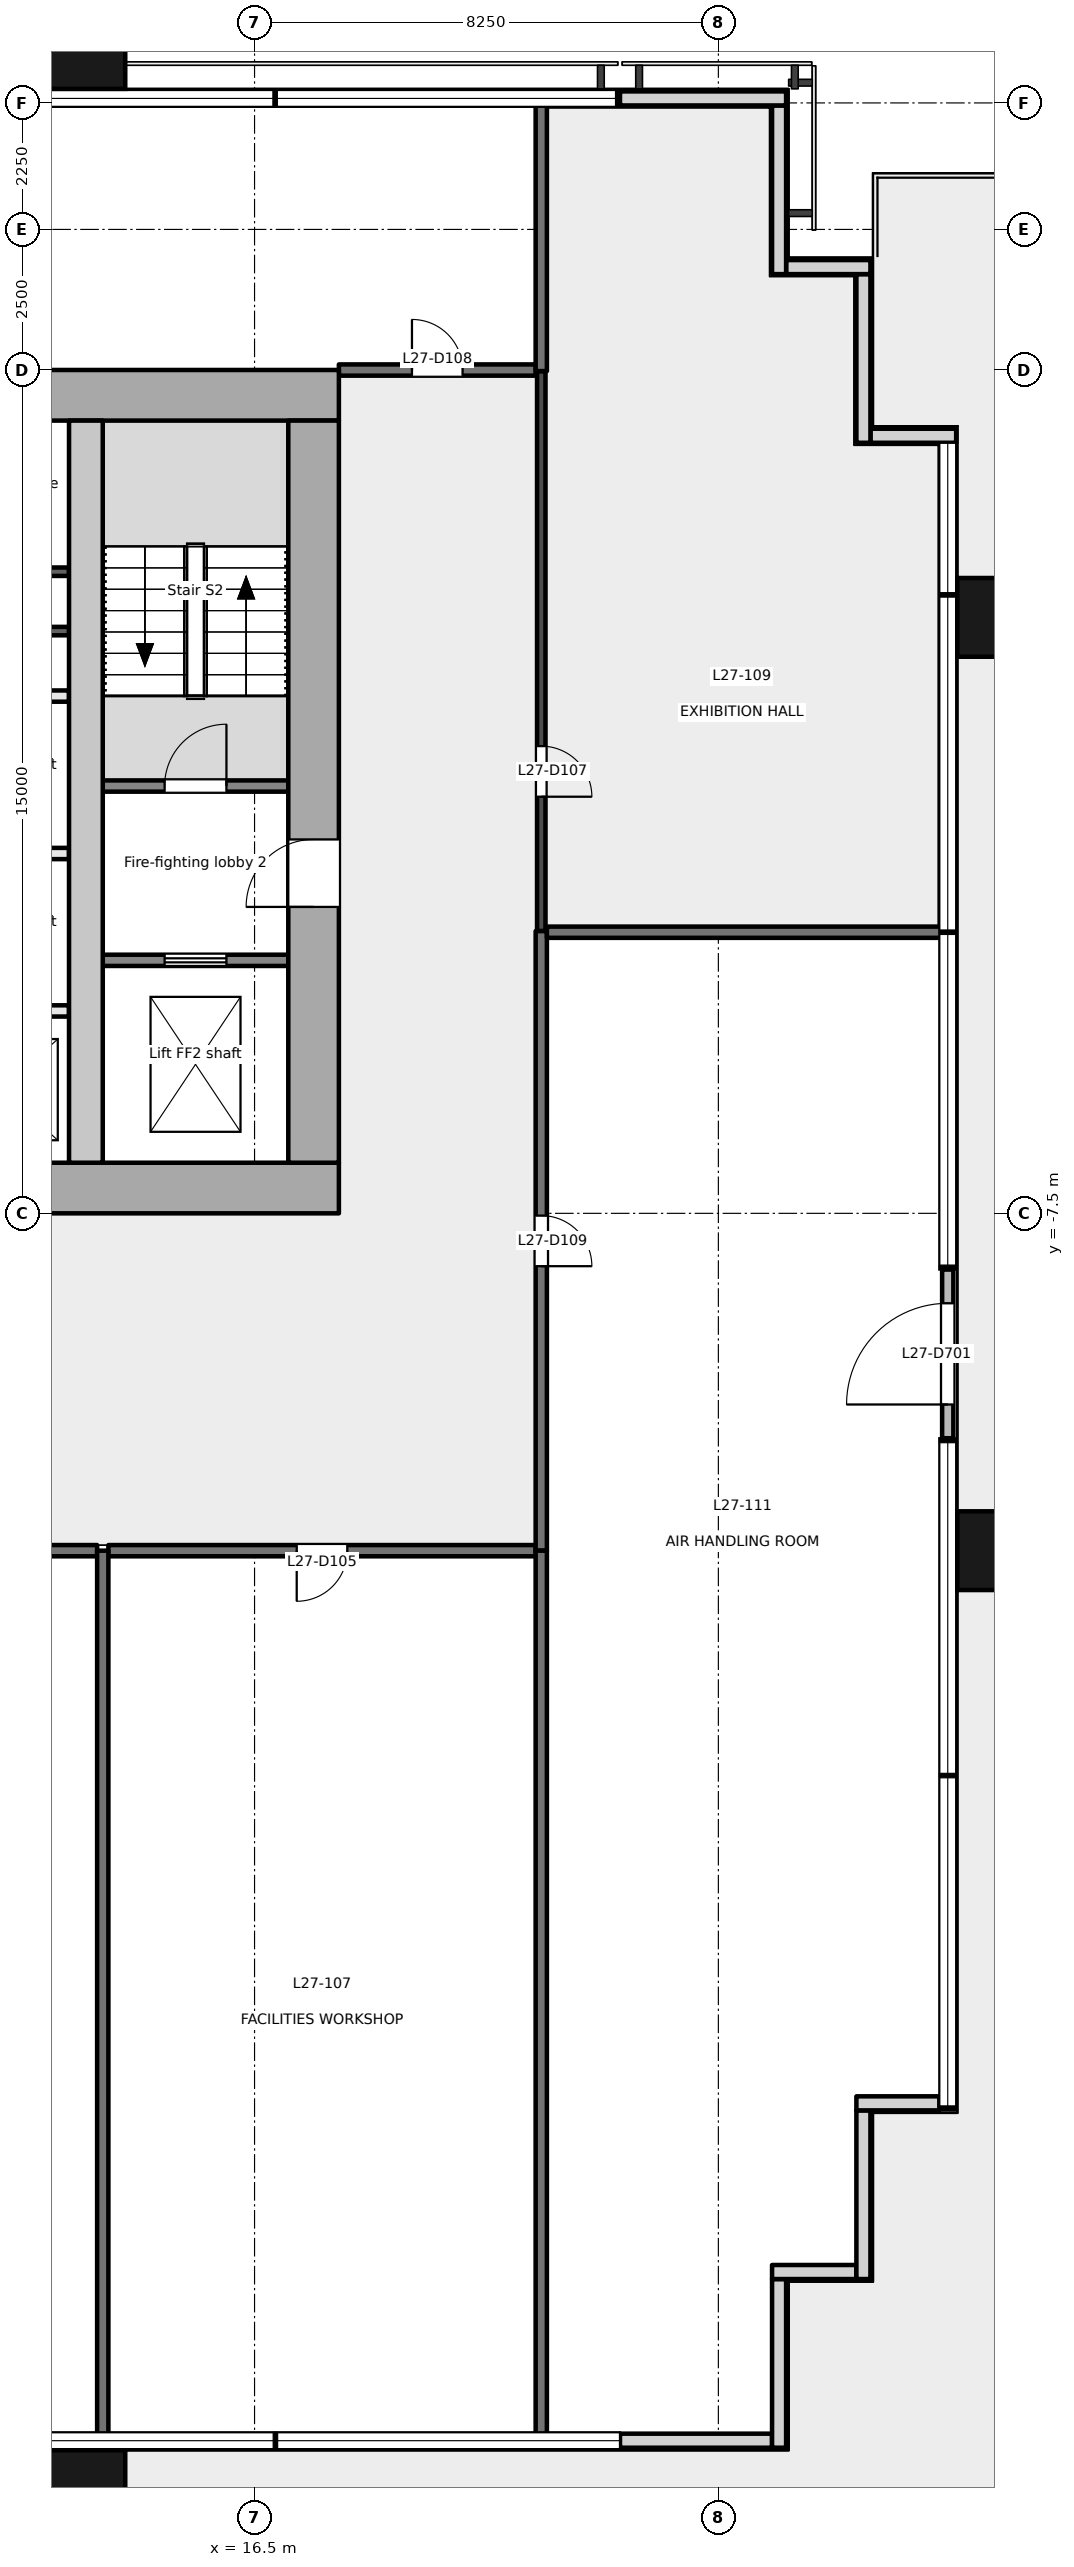
"""IFC4 building model, lengths in metres.
Left out: names, types, materials, properties, quantities, classifications, styles, units other than length and angle.
Written with IfcOpenShell. Run it as: python <this file> out.ifc"""

import sys

from ifc_helpers import new_model, si_unit, direction, frame, frame_2d, origin, origin_2d, place, context, subcontext, project, spatial, rectangle, extrude, element, fill, save


model = new_model("IFC4")
c1 = context("Model", 3, precision=1e-05, world=origin(), true_north=direction((0.0, 1.0)))
c2 = subcontext(c1, "Body", "Model", "MODEL_VIEW")
j1 = project(units=[si_unit("LENGTHUNIT", "METRE"), si_unit("PLANEANGLEUNIT", "RADIAN")], contexts=[c1])
p1 = place(None, origin())
s1 = spatial("IfcSite", under=j1, at=p1, CompositionType="ELEMENT")
p2 = place(p1, origin())
s2 = spatial("IfcBuilding", under=s1, at=p2, CompositionType="ELEMENT")
p3 = place(p2, frame((0.0, 0.0, 120.7)))
s3 = spatial("IfcBuildingStorey", under=s2, at=p3, CompositionType="ELEMENT", Elevation=120.7)
for number, where, z_axis, x_axis in (
    (1, (13.5, -30.4, -0.2), (0.0, 0.0, 1.0), (1.0, 0.0, 0.0)),
    (2, (29.9, -13.5, -0.2), (0.0, 0.0, 1.0), (0.0, 1.0, 0.0)),
    (3, (29.9, 3.1, -0.2), (0.0, 0.0, 1.0), (0.0, 1.0, 0.0)),
    (4, (13.5, 13.4, -0.2), (0.0, 0.0, 1.0), (1.0, 0.0, 0.0)),
):
    element("IfcColumn", number, at=place(p3, frame(where, z_axis=z_axis, x_axis=x_axis)), inside=s3, PredefinedType="COLUMN", context=c2, shape_type="SweptSolid", body=[
        extrude(rectangle(XDim=1.4, YDim=1.8, at=origin_2d()), origin(), (0.0, 0.0, 1.0), 5.4),
    ])
p4 = place(p3, frame((23.0, -29.33, 0.0), z_axis=(0.0, 0.0, 1.0), x_axis=(1.0, 0.0, 0.0)))
e5 = element("IfcWall", 5, at=p4, inside=s3, PredefinedType="SOLIDWALL", context=c2, shape_type="SweptSolid", body=[
    extrude(rectangle(XDim=2.705, YDim=0.25, at=frame_2d((1.353, 0.0))), origin(), (0.0, 0.0, 1.0), 5.2),
])
p5 = place(p3, frame((25.83, -29.455, 0.0), z_axis=(0.0, 0.0, 1.0), x_axis=(0.0, 1.0, 0.0)))
e6 = element("IfcWall", 6, at=p5, inside=s3, PredefinedType="SOLIDWALL", context=c2, shape_type="SweptSolid", body=[
    extrude(rectangle(XDim=3.0, YDim=0.25, at=frame_2d((1.5, 0.0))), origin(), (0.0, 0.0, 1.0), 5.2),
])
p6 = place(p3, frame((25.705, -26.33, 0.0), z_axis=(0.0, 0.0, 1.0), x_axis=(1.0, 0.0, 0.0)))
e7 = element("IfcWall", 7, at=p6, inside=s3, PredefinedType="SOLIDWALL", context=c2, shape_type="SweptSolid", body=[
    extrude(rectangle(XDim=1.5, YDim=0.25, at=frame_2d((0.75, 0.0))), origin(), (0.0, 0.0, 1.0), 5.2),
])
p7 = place(p3, frame((27.33, -26.455, 0.0), z_axis=(0.0, 0.0, 1.0), x_axis=(0.0, 1.0, 0.0)))
e8 = element("IfcWall", 8, at=p7, inside=s3, PredefinedType="SOLIDWALL", context=c2, shape_type="SweptSolid", body=[
    extrude(rectangle(XDim=3.0, YDim=0.25, at=frame_2d((1.5, 0.0))), origin(), (0.0, 0.0, 1.0), 5.2),
])
p8 = place(p3, frame((27.205, -23.33, 0.0), z_axis=(0.0, 0.0, 1.0), x_axis=(1.0, 0.0, 0.0)))
e9 = element("IfcWall", 9, at=p8, inside=s3, PredefinedType="SOLIDWALL", context=c2, shape_type="SweptSolid", body=[
    extrude(rectangle(XDim=1.475, YDim=0.25, at=frame_2d((0.737, 0.0))), origin(), (0.0, 0.0, 1.0), 5.2),
])
p9 = place(p3, frame((28.83, -11.5, 0.0), z_axis=(0.0, 0.0, 1.0), x_axis=(0.0, 1.0, 0.0)))
e10 = element("IfcWall", 10, at=p9, inside=s3, PredefinedType="SOLIDWALL", context=c2, shape_type="SweptSolid", body=[
    extrude(rectangle(XDim=3.0, YDim=0.2, at=frame_2d((1.5, 0.0))), origin(), (0.0, 0.0, 1.0), 4.1),
])
p10 = place(p9, frame((0.6, 0.0, 0.0)))
e11 = element("IfcOpeningElement", 11, at=p10, cuts=e10, PredefinedType="OPENING", context=c2, shape_type="SweptSolid", body=[
    extrude(rectangle(XDim=1.8, YDim=2.4, at=frame_2d((0.9, 1.2))), frame((0.0, 0.111, 0.0), z_axis=(0.0, -1.0, 0.0), x_axis=(1.0, 0.0, 0.0)), (0.0, 0.0, 1.0), 0.221),
])
p11 = place(p3, frame((28.98, 6.33, 0.0), z_axis=(0.0, 0.0, 1.0), x_axis=(-1.0, 0.0, 0.0)))
e12 = element("IfcWall", 12, at=p11, inside=s3, PredefinedType="SOLIDWALL", context=c2, shape_type="SweptSolid", body=[
    extrude(rectangle(XDim=1.525, YDim=0.25, at=frame_2d((0.762, 0.0))), origin(), (0.0, 0.0, 1.0), 5.2),
])
p12 = place(p3, frame((27.33, 6.205, 0.0), z_axis=(0.0, 0.0, 1.0), x_axis=(0.0, 1.0, 0.0)))
e13 = element("IfcWall", 13, at=p12, inside=s3, PredefinedType="SOLIDWALL", context=c2, shape_type="SweptSolid", body=[
    extrude(rectangle(XDim=3.0, YDim=0.25, at=frame_2d((1.5, 0.0))), origin(), (0.0, 0.0, 1.0), 5.2),
])
p13 = place(p3, frame((27.455, 9.33, 0.0), z_axis=(0.0, 0.0, 1.0), x_axis=(-1.0, 0.0, 0.0)))
e14 = element("IfcWall", 14, at=p13, inside=s3, PredefinedType="SOLIDWALL", context=c2, shape_type="SweptSolid", body=[
    extrude(rectangle(XDim=1.5, YDim=0.25, at=frame_2d((0.75, 0.0))), origin(), (0.0, 0.0, 1.0), 5.2),
])
p14 = place(p3, frame((25.83, 9.205, 0.0), z_axis=(0.0, 0.0, 1.0), x_axis=(0.0, 1.0, 0.0)))
e15 = element("IfcWall", 15, at=p14, inside=s3, PredefinedType="SOLIDWALL", context=c2, shape_type="SweptSolid", body=[
    extrude(rectangle(XDim=3.0, YDim=0.25, at=frame_2d((1.5, 0.0))), origin(), (0.0, 0.0, 1.0), 5.2),
])
p15 = place(p3, frame((25.955, 12.33, 0.0), z_axis=(0.0, 0.0, 1.0), x_axis=(-1.0, 0.0, 0.0)))
e16 = element("IfcWall", 16, at=p15, inside=s3, PredefinedType="SOLIDWALL", context=c2, shape_type="SweptSolid", body=[
    extrude(rectangle(XDim=2.955, YDim=0.25, at=frame_2d((1.478, 0.0))), origin(), (0.0, 0.0, 1.0), 5.2),
])
p16 = place(p3, frame((-18.0, -7.05, -0.2), z_axis=(0.0, 0.0, 1.0), x_axis=(1.0, 0.0, 0.0)))
e17 = element("IfcWall", 17, at=p16, inside=s3, PredefinedType="SHEAR", context=c2, shape_type="SweptSolid", body=[
    extrude(rectangle(XDim=36.0, YDim=0.9, at=frame_2d((18.0, 0.0))), origin(), (0.0, 0.0, 1.0), 5.4),
])
p17 = place(p16, frame((7.8, 0.0, 0.2)))
e18 = element("IfcOpeningElement", 18, at=p17, cuts=e17, PredefinedType="OPENING", context=c2, shape_type="SweptSolid", body=[
    extrude(rectangle(XDim=2.4, YDim=2.1, at=frame_2d((1.2, 1.05))), frame((0.0, 0.46, 0.0), z_axis=(0.0, -1.0, 0.0), x_axis=(1.0, 0.0, 0.0)), (0.0, 0.0, 1.0), 0.921),
])
p18 = place(p16, frame((17.4, 0.0, 0.2)))
e19 = element("IfcOpeningElement", 19, at=p18, cuts=e17, PredefinedType="OPENING", context=c2, shape_type="SweptSolid", body=[
    extrude(rectangle(XDim=1.2, YDim=2.1, at=frame_2d((0.6, 1.05))), frame((0.0, 0.46, 0.0), z_axis=(0.0, -1.0, 0.0), x_axis=(1.0, 0.0, 0.0)), (0.0, 0.0, 1.0), 0.921),
])
p19 = place(p16, frame((26.1, 0.0, 0.2)))
e20 = element("IfcOpeningElement", 20, at=p19, cuts=e17, PredefinedType="OPENING", context=c2, shape_type="SweptSolid", body=[
    extrude(rectangle(XDim=2.4, YDim=2.1, at=frame_2d((1.2, 1.05))), frame((0.0, 0.46, 0.0), z_axis=(0.0, -1.0, 0.0), x_axis=(1.0, 0.0, 0.0)), (0.0, 0.0, 1.0), 0.921),
])
p20 = place(p3, frame((-18.0, 7.05, -0.2), z_axis=(0.0, 0.0, 1.0), x_axis=(1.0, 0.0, 0.0)))
e21 = element("IfcWall", 21, at=p20, inside=s3, PredefinedType="SHEAR", context=c2, shape_type="SweptSolid", body=[
    extrude(rectangle(XDim=36.0, YDim=0.9, at=frame_2d((18.0, 0.0))), origin(), (0.0, 0.0, 1.0), 5.4),
])
p21 = place(p3, frame((17.55, -6.6, -0.2), z_axis=(0.0, 0.0, 1.0), x_axis=(0.0, 1.0, 0.0)))
e22 = element("IfcWall", 22, at=p21, inside=s3, PredefinedType="SHEAR", context=c2, shape_type="SweptSolid", body=[
    extrude(rectangle(XDim=13.2, YDim=0.9, at=frame_2d((6.6, 0.0))), origin(), (0.0, 0.0, 1.0), 5.4),
])
p22 = place(p21, frame((4.55, 0.0, 0.2)))
e23 = element("IfcOpeningElement", 23, at=p22, cuts=e22, PredefinedType="OPENING", context=c2, shape_type="SweptSolid", body=[
    extrude(rectangle(XDim=1.2, YDim=2.1, at=frame_2d((0.6, 1.05))), frame((0.0, 0.46, 0.0), z_axis=(0.0, -1.0, 0.0), x_axis=(1.0, 0.0, 0.0)), (0.0, 0.0, 1.0), 0.921),
])
p23 = place(p3, frame((13.5, -6.6, -0.2), z_axis=(0.0, 0.0, 1.0), x_axis=(0.0, 1.0, 0.0)))
e24 = element("IfcWall", 24, at=p23, inside=s3, PredefinedType="SHEAR", context=c2, shape_type="SweptSolid", body=[
    extrude(rectangle(XDim=13.2, YDim=0.6, at=frame_2d((6.6, 0.0))), origin(), (0.0, 0.0, 1.0), 5.4),
])
p24 = place(p3, frame((13.8, -3.0, 0.0), z_axis=(0.0, 0.0, 1.0), x_axis=(1.0, 0.0, 0.0)))
e25 = element("IfcWall", 25, at=p24, inside=s3, PredefinedType="PARTITIONING", context=c2, shape_type="SweptSolid", body=[
    extrude(rectangle(XDim=3.3, YDim=0.2, at=frame_2d((1.65, 0.0))), origin(), (0.0, 0.0, 1.0), 5.2),
])
p25 = place(p24, frame((1.1, 0.0, 0.0)))
e26 = element("IfcOpeningElement", 26, at=p25, cuts=e25, PredefinedType="OPENING", context=c2, shape_type="SweptSolid", body=[
    extrude(rectangle(XDim=1.1, YDim=2.1, at=frame_2d((0.55, 1.05))), frame((0.0, 0.111, 0.0), z_axis=(0.0, -1.0, 0.0), x_axis=(1.0, 0.0, 0.0)), (0.0, 0.0, 1.0), 0.221),
])
p26 = place(p3, frame((13.8, 0.1, 0.0), z_axis=(0.0, 0.0, 1.0), x_axis=(1.0, 0.0, 0.0)))
e27 = element("IfcWall", 27, at=p26, inside=s3, PredefinedType="PARTITIONING", context=c2, shape_type="SweptSolid", body=[
    extrude(rectangle(XDim=3.3, YDim=0.2, at=frame_2d((1.65, 0.0))), origin(), (0.0, 0.0, 1.0), 5.2),
])
p27 = place(p26, frame((1.1, 0.0, 0.0)))
e28 = element("IfcOpeningElement", 28, at=p27, cuts=e27, PredefinedType="OPENING", context=c2, shape_type="SweptSolid", body=[
    extrude(rectangle(XDim=1.1, YDim=2.1, at=frame_2d((0.55, 1.05))), frame((0.0, 0.111, 0.0), z_axis=(0.0, -1.0, 0.0), x_axis=(1.0, 0.0, 0.0)), (0.0, 0.0, 1.0), 0.221),
])
for number, where, z_axis, x_axis in (
    (29, (10.9, -3.9, 0.0), (0.0, 0.0, 1.0), (1.0, 0.0, 0.0)),
    (30, (10.9, -1.1, 0.0), (0.0, 0.0, 1.0), (1.0, 0.0, 0.0)),
    (31, (10.9, 1.7, 0.0), (0.0, 0.0, 1.0), (1.0, 0.0, 0.0)),
):
    element("IfcWall", number, at=place(p3, frame(where, z_axis=z_axis, x_axis=x_axis)), inside=s3, PredefinedType="PARTITIONING", context=c2, shape_type="SweptSolid", body=[
        extrude(rectangle(XDim=2.3, YDim=0.2, at=frame_2d((1.15, 0.0))), origin(), (0.0, 0.0, 1.0), 5.2),
    ])
for number, where, z_axis, x_axis in (
    (32, (10.9, 2.856, 0.0), (0.0, 0.0, 1.0), (1.0, 0.0, 0.0)),
    (33, (10.9, 3.912, 0.0), (0.0, 0.0, 1.0), (1.0, 0.0, 0.0)),
):
    element("IfcWall", number, at=place(p3, frame(where, z_axis=z_axis, x_axis=x_axis)), inside=s3, PredefinedType="PARTITIONING", context=c2, shape_type="SweptSolid", body=[
        extrude(rectangle(XDim=2.3, YDim=0.15, at=frame_2d((1.15, 0.0))), origin(), (0.0, 0.0, 1.0), 5.2),
    ])
p28 = place(p3, frame((13.7, -13.5, 0.0), z_axis=(0.0, 0.0, 1.0), x_axis=(-1.0, 0.0, 0.0)))
e34 = element("IfcWall", 34, at=p28, inside=s3, PredefinedType="PARTITIONING", context=c2, shape_type="SweptSolid", body=[
    extrude(rectangle(XDim=12.067, YDim=0.2, at=frame_2d((6.033, 0.0))), origin(), (0.0, 0.0, 1.0), 4.3),
])
p29 = place(p28, frame((5.584, 0.0, 0.0)))
e35 = element("IfcOpeningElement", 35, at=p29, cuts=e34, PredefinedType="OPENING", context=c2, shape_type="SweptSolid", body=[
    extrude(rectangle(XDim=0.9, YDim=2.1, at=frame_2d((0.45, 1.05))), frame((0.0, 0.111, 0.0), z_axis=(0.0, -1.0, 0.0), x_axis=(1.0, 0.0, 0.0)), (0.0, 0.0, 1.0), 0.221),
])
p30 = place(p3, frame((21.5, -13.5, 0.0), z_axis=(0.0, 0.0, 1.0), x_axis=(-1.0, 0.0, 0.0)))
e36 = element("IfcWall", 36, at=p30, inside=s3, PredefinedType="PARTITIONING", context=c2, shape_type="SweptSolid", body=[
    extrude(rectangle(XDim=7.6, YDim=0.2, at=frame_2d((3.8, 0.0))), origin(), (0.0, 0.0, 1.0), 5.2),
])
p31 = place(p30, frame((3.35, 0.0, 0.0)))
e37 = element("IfcOpeningElement", 37, at=p31, cuts=e36, PredefinedType="OPENING", context=c2, shape_type="SweptSolid", body=[
    extrude(rectangle(XDim=0.9, YDim=2.1, at=frame_2d((0.45, 1.05))), frame((0.0, 0.111, 0.0), z_axis=(0.0, -1.0, 0.0), x_axis=(1.0, 0.0, 0.0)), (0.0, 0.0, 1.0), 0.221),
])
p32 = place(p3, frame((21.6, 7.48, 0.0), z_axis=(0.0, 0.0, 1.0), x_axis=(0.0, -1.0, 0.0)))
e38 = element("IfcWall", 38, at=p32, inside=s3, PredefinedType="PARTITIONING", context=c2, shape_type="SweptSolid", body=[
    extrude(rectangle(XDim=9.96, YDim=0.15, at=frame_2d((4.98, 0.0))), origin(), (0.0, 0.0, 1.0), 4.7),
])
p33 = place(p32, frame((6.67, 0.0, 0.0)))
e39 = element("IfcOpeningElement", 39, at=p33, cuts=e38, PredefinedType="OPENING", context=c2, shape_type="SweptSolid", body=[
    extrude(rectangle(XDim=0.9, YDim=2.1, at=frame_2d((0.45, 1.05))), frame((0.0, 0.085, 0.0), z_axis=(0.0, -1.0, 0.0), x_axis=(1.0, 0.0, 0.0)), (0.0, 0.0, 1.0), 0.171),
])
p34 = place(p3, frame((18.0, 7.499, 0.0), z_axis=(0.0, 0.0, 1.0), x_axis=(1.0, 0.0, 0.0)))
e40 = element("IfcWall", 40, at=p34, inside=s3, PredefinedType="PARTITIONING", context=c2, shape_type="SweptSolid", body=[
    extrude(rectangle(XDim=3.5, YDim=0.2, at=frame_2d((1.75, 0.0))), origin(), (0.0, 0.0, 1.0), 5.2),
])
p35 = place(p34, frame((1.3, 0.0, 0.0)))
e41 = element("IfcOpeningElement", 41, at=p35, cuts=e40, PredefinedType="OPENING", context=c2, shape_type="SweptSolid", body=[
    extrude(rectangle(XDim=0.9, YDim=2.1, at=frame_2d((0.45, 1.05))), frame((0.0, 0.111, 0.0), z_axis=(0.0, -1.0, 0.0), x_axis=(1.0, 0.0, 0.0)), (0.0, 0.0, 1.0), 0.221),
])
p36 = place(p3, frame((21.6, -2.48, 0.0), z_axis=(0.0, 0.0, 1.0), x_axis=(0.0, -1.0, 0.0)))
e42 = element("IfcWall", 42, at=p36, inside=s3, PredefinedType="PARTITIONING", context=c2, shape_type="SweptSolid", body=[
    extrude(rectangle(XDim=11.02, YDim=0.2, at=frame_2d((5.51, 0.0))), origin(), (0.0, 0.0, 1.0), 4.7),
])
p37 = place(p36, frame((5.06, 0.0, 0.0)))
e43 = element("IfcOpeningElement", 43, at=p37, cuts=e42, PredefinedType="OPENING", context=c2, shape_type="SweptSolid", body=[
    extrude(rectangle(XDim=0.9, YDim=2.1, at=frame_2d((0.45, 1.05))), frame((0.0, 0.111, 0.0), z_axis=(0.0, -1.0, 0.0), x_axis=(1.0, 0.0, 0.0)), (0.0, 0.0, 1.0), 0.221),
])
for number, where, z_axis, x_axis in (
    (44, (13.8, -13.5, 0.0), (0.0, 0.0, 1.0), (0.0, -1.0, 0.0)),
    (45, (21.6, -13.5, 0.0), (0.0, 0.0, 1.0), (0.0, -1.0, 0.0)),
):
    element("IfcWall", number, at=place(p3, frame(where, z_axis=z_axis, x_axis=x_axis)), inside=s3, PredefinedType="PARTITIONING", context=c2, shape_type="SweptSolid", body=[
        extrude(rectangle(XDim=15.74, YDim=0.2, at=frame_2d((7.87, 0.0))), origin(), (0.0, 0.0, 1.0), 5.2),
    ])
p38 = place(p3, frame((21.6, 7.48, 0.0), z_axis=(0.0, 0.0, 1.0), x_axis=(0.0, 1.0, 0.0)))
e46 = element("IfcWall", 46, at=p38, inside=s3, PredefinedType="PARTITIONING", context=c2, shape_type="SweptSolid", body=[
    extrude(rectangle(XDim=4.76, YDim=0.2, at=frame_2d((2.38, 0.0))), origin(), (0.0, 0.0, 1.0), 5.2),
])
p39 = place(p3, frame((28.74, -2.5, 0.0), z_axis=(0.0, 0.0, 1.0), x_axis=(-1.0, 0.0, 0.0)))
e47 = element("IfcWall", 47, at=p39, inside=s3, PredefinedType="PARTITIONING", context=c2, shape_type="SweptSolid", body=[
    extrude(rectangle(XDim=7.04, YDim=0.2, at=frame_2d((3.52, 0.0))), origin(), (0.0, 0.0, 1.0), 5.2),
])
p40 = place(p10, origin())
e48 = element("IfcDoor", 48, at=p40, inside=s3, OperationType="DOUBLE_DOOR_SINGLE_SWING", PredefinedType="DOOR", context=c2, shape_type="SweptSolid", body=[
    extrude(rectangle(XDim=1.8, YDim=2.4, at=frame_2d((0.9, 1.2))), frame((0.0, 0.025, 0.0), z_axis=(0.0, -1.0, 0.0), x_axis=(1.0, 0.0, 0.0)), (0.0, 0.0, 1.0), 0.05),
])
fill(e11, e48)
p41 = place(p25, origin())
e49 = element("IfcDoor", 49, at=p41, inside=s3, OperationType="DOUBLE_DOOR_SLIDING", PredefinedType="DOOR", context=c2, shape_type="SweptSolid", body=[
    extrude(rectangle(XDim=1.1, YDim=2.1, at=frame_2d((0.55, 1.05))), frame((0.0, 0.025, 0.0), z_axis=(0.0, -1.0, 0.0), x_axis=(1.0, 0.0, 0.0)), (0.0, 0.0, 1.0), 0.05),
])
fill(e26, e49)
p42 = place(p22, origin())
e50 = element("IfcDoor", 50, at=p42, inside=s3, OperationType="SINGLE_SWING_LEFT", PredefinedType="DOOR", context=c2, shape_type="SweptSolid", body=[
    extrude(rectangle(XDim=1.2, YDim=2.1, at=frame_2d((0.6, 1.05))), frame((0.0, 0.025, 0.0), z_axis=(0.0, -1.0, 0.0), x_axis=(1.0, 0.0, 0.0)), (0.0, 0.0, 1.0), 0.05),
])
fill(e23, e50)
p43 = place(p27, origin())
e51 = element("IfcDoor", 51, at=p43, inside=s3, OperationType="SINGLE_SWING_RIGHT", PredefinedType="DOOR", context=c2, shape_type="SweptSolid", body=[
    extrude(rectangle(XDim=1.1, YDim=2.1, at=frame_2d((0.55, 1.05))), frame((0.0, 0.025, 0.0), z_axis=(0.0, -1.0, 0.0), x_axis=(1.0, 0.0, 0.0)), (0.0, 0.0, 1.0), 0.05),
])
fill(e28, e51)
p44 = place(p31, origin())
e52 = element("IfcDoor", 52, at=p44, inside=s3, OperationType="SINGLE_SWING_RIGHT", PredefinedType="DOOR", context=c2, shape_type="SweptSolid", body=[
    extrude(rectangle(XDim=0.9, YDim=2.1, at=frame_2d((0.45, 1.05))), frame((0.0, 0.025, 0.0), z_axis=(0.0, -1.0, 0.0), x_axis=(1.0, 0.0, 0.0)), (0.0, 0.0, 1.0), 0.05),
])
fill(e37, e52)
p45 = place(p33, origin())
e53 = element("IfcDoor", 53, at=p45, inside=s3, OperationType="SINGLE_SWING_RIGHT", PredefinedType="DOOR", context=c2, shape_type="SweptSolid", body=[
    extrude(rectangle(XDim=0.9, YDim=2.1, at=frame_2d((0.45, 1.05))), frame((0.0, 0.025, 0.0), z_axis=(0.0, -1.0, 0.0), x_axis=(1.0, 0.0, 0.0)), (0.0, 0.0, 1.0), 0.05),
])
fill(e39, e53)
p46 = place(p35, origin())
e54 = element("IfcDoor", 54, at=p46, inside=s3, OperationType="SINGLE_SWING_LEFT", PredefinedType="DOOR", context=c2, shape_type="SweptSolid", body=[
    extrude(rectangle(XDim=0.9, YDim=2.1, at=frame_2d((0.45, 1.05))), frame((0.0, 0.025, 0.0), z_axis=(0.0, -1.0, 0.0), x_axis=(1.0, 0.0, 0.0)), (0.0, 0.0, 1.0), 0.05),
])
fill(e41, e54)
p47 = place(p37, origin())
e55 = element("IfcDoor", 55, at=p47, inside=s3, OperationType="SINGLE_SWING_RIGHT", PredefinedType="DOOR", context=c2, shape_type="SweptSolid", body=[
    extrude(rectangle(XDim=0.9, YDim=2.1, at=frame_2d((0.45, 1.05))), frame((0.0, 0.025, 0.0), z_axis=(0.0, -1.0, 0.0), x_axis=(1.0, 0.0, 0.0)), (0.0, 0.0, 1.0), 0.05),
])
fill(e43, e55)
save(model, sys.argv[1])
